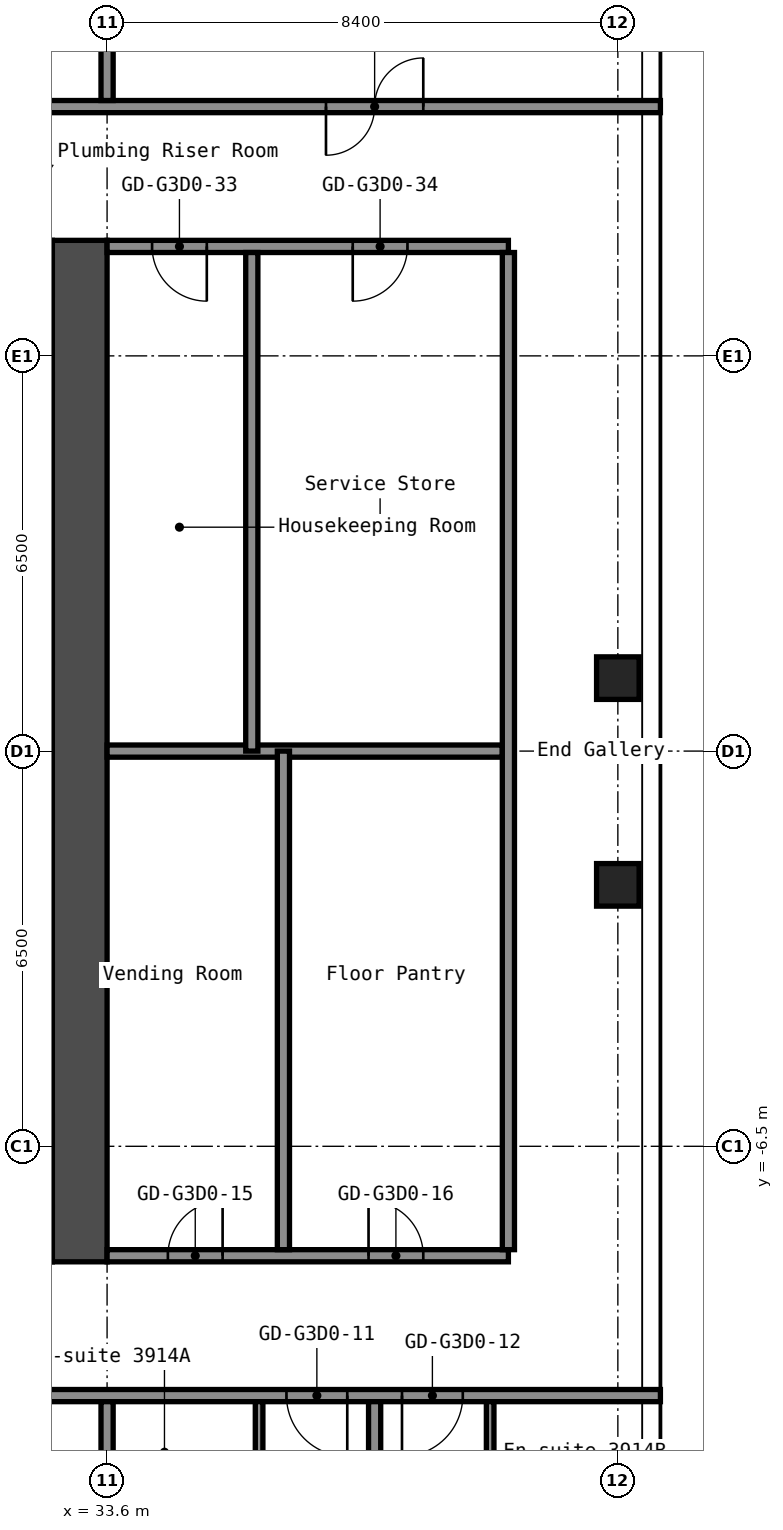
"""IFC4 building model, lengths in metres.
Left out: names, types, materials, properties, quantities, classifications, styles, units other than length and angle.
Written with IfcOpenShell. Run it as: python <this file> out.ifc"""

import sys

from ifc_helpers import new_model, si_unit, direction, frame, frame_2d, origin, origin_2d, place, context, subcontext, project, spatial, rectangle, hollow_rectangle, extrude, element, fill, save


model = new_model("IFC4")
c1 = context("Model", 3, precision=1e-05, world=origin(), true_north=direction((0.0, 1.0)))
c2 = subcontext(c1, "Body", "Model", "MODEL_VIEW")
j1 = project(units=[si_unit("LENGTHUNIT", "METRE"), si_unit("PLANEANGLEUNIT", "RADIAN")], contexts=[c1])
p1 = place(None, origin())
s1 = spatial("IfcSite", under=j1, at=p1, CompositionType="ELEMENT")
p2 = place(p1, origin())
s2 = spatial("IfcBuilding", under=s1, at=p2, CompositionType="ELEMENT")
p3 = place(p2, frame((0.0, 0.0, 140.6)))
s3 = spatial("IfcBuildingStorey", under=s2, at=p3, CompositionType="ELEMENT", Elevation=140.6)
for number, where, z_axis, x_axis in (
    (1, (42.0, -2.2, 0.0), (0.0, 0.0, 1.0), (1.0, 0.0, 0.0)),
    (2, (42.0, 1.2, 0.0), (0.0, 0.0, 1.0), (1.0, 0.0, 0.0)),
):
    element("IfcColumn", number, at=place(p3, frame(where, z_axis=z_axis, x_axis=x_axis)), inside=s3, PredefinedType="COLUMN", context=c2, shape_type="SweptSolid", body=[
        extrude(hollow_rectangle(XDim=0.7, YDim=0.7, WallThickness=0.028, at=origin_2d()), origin(), (0.0, 0.0, 1.0), 2.75),
    ])
p4 = place(p3, frame((33.15, -8.4, 0.0), z_axis=(0.0, 0.0, 1.0), x_axis=(0.0, 1.0, 0.0)))
e3 = element("IfcWall", 3, at=p4, inside=s3, PredefinedType="SHEAR", context=c2, shape_type="SweptSolid", body=[
    extrude(rectangle(XDim=16.8, YDim=0.9, at=frame_2d((8.4, 0.0))), origin(), (0.0, 0.0, 1.0), 2.75),
])
p5 = place(p3, frame((16.8, -10.6, 0.0), z_axis=(0.0, 0.0, 1.0), x_axis=(1.0, 0.0, 0.0)))
e4 = element("IfcWall", 4, at=p5, inside=s3, PredefinedType="PARTITIONING", context=c2, shape_type="SweptSolid", body=[
    extrude(rectangle(XDim=25.9, YDim=0.2, at=frame_2d((12.95, 0.0))), origin(), (0.0, 0.0, 1.0), 2.75),
])
p6 = place(p5, frame((2.85, 0.0, 0.0)))
e5 = element("IfcOpeningElement", 5, at=p6, cuts=e4, PredefinedType="OPENING", context=c2, shape_type="SweptSolid", body=[
    extrude(rectangle(XDim=1.0, YDim=2.1, at=frame_2d((0.5, 1.05))), frame((0.0, 0.11, 0.0), z_axis=(0.0, -1.0, 0.0), x_axis=(1.0, 0.0, 0.0)), (0.0, 0.0, 1.0), 0.22),
])
p7 = place(p5, frame((4.55, 0.0, 0.0)))
e6 = element("IfcOpeningElement", 6, at=p7, cuts=e4, PredefinedType="OPENING", context=c2, shape_type="SweptSolid", body=[
    extrude(rectangle(XDim=1.0, YDim=2.1, at=frame_2d((0.5, 1.05))), frame((0.0, 0.11, 0.0), z_axis=(0.0, -1.0, 0.0), x_axis=(1.0, 0.0, 0.0)), (0.0, 0.0, 1.0), 0.22),
])
p8 = place(p5, frame((10.4, 0.0, 0.0)))
e7 = element("IfcOpeningElement", 7, at=p8, cuts=e4, PredefinedType="OPENING", context=c2, shape_type="SweptSolid", body=[
    extrude(rectangle(XDim=1.0, YDim=2.1, at=frame_2d((0.5, 1.05))), frame((0.0, 0.11, 0.0), z_axis=(0.0, -1.0, 0.0), x_axis=(1.0, 0.0, 0.0)), (0.0, 0.0, 1.0), 0.22),
])
p9 = place(p5, frame((19.75, 0.0, 0.0)))
e8 = element("IfcOpeningElement", 8, at=p9, cuts=e4, PredefinedType="OPENING", context=c2, shape_type="SweptSolid", body=[
    extrude(rectangle(XDim=1.0, YDim=2.1, at=frame_2d((0.5, 1.05))), frame((0.0, 0.11, 0.0), z_axis=(0.0, -1.0, 0.0), x_axis=(1.0, 0.0, 0.0)), (0.0, 0.0, 1.0), 0.22),
])
p10 = place(p5, frame((21.65, 0.0, 0.0)))
e9 = element("IfcOpeningElement", 9, at=p10, cuts=e4, PredefinedType="OPENING", context=c2, shape_type="SweptSolid", body=[
    extrude(rectangle(XDim=1.0, YDim=2.1, at=frame_2d((0.5, 1.05))), frame((0.0, 0.11, 0.0), z_axis=(0.0, -1.0, 0.0), x_axis=(1.0, 0.0, 0.0)), (0.0, 0.0, 1.0), 0.22),
])
p11 = place(p3, frame((33.6, -8.3, 0.0), z_axis=(0.0, 0.0, 1.0), x_axis=(1.0, 0.0, 0.0)))
e10 = element("IfcWall", 10, at=p11, inside=s3, PredefinedType="PARTITIONING", context=c2, shape_type="SweptSolid", body=[
    extrude(rectangle(XDim=6.6, YDim=0.2, at=frame_2d((3.3, 0.0))), origin(), (0.0, 0.0, 1.0), 2.75),
])
p12 = place(p11, frame((1.0, 0.0, 0.0)))
e11 = element("IfcOpeningElement", 11, at=p12, cuts=e10, PredefinedType="OPENING", context=c2, shape_type="SweptSolid", body=[
    extrude(rectangle(XDim=0.9, YDim=2.1, at=frame_2d((0.45, 1.05))), frame((0.0, 0.11, 0.0), z_axis=(0.0, -1.0, 0.0), x_axis=(1.0, 0.0, 0.0)), (0.0, 0.0, 1.0), 0.22),
])
p13 = place(p11, frame((4.3, 0.0, 0.0)))
e12 = element("IfcOpeningElement", 12, at=p13, cuts=e10, PredefinedType="OPENING", context=c2, shape_type="SweptSolid", body=[
    extrude(rectangle(XDim=0.9, YDim=2.1, at=frame_2d((0.45, 1.05))), frame((0.0, 0.11, 0.0), z_axis=(0.0, -1.0, 0.0), x_axis=(1.0, 0.0, 0.0)), (0.0, 0.0, 1.0), 0.22),
])
p14 = place(p3, frame((33.6, 0.0, 0.0), z_axis=(0.0, 0.0, 1.0), x_axis=(1.0, 0.0, 0.0)))
e13 = element("IfcWall", 13, at=p14, inside=s3, PredefinedType="PARTITIONING", context=c2, shape_type="SweptSolid", body=[
    extrude(rectangle(XDim=6.5, YDim=0.2, at=frame_2d((3.25, 0.0))), origin(), (0.0, 0.0, 1.0), 2.75),
])
p15 = place(p3, frame((33.6, 8.3, 0.0), z_axis=(0.0, 0.0, 1.0), x_axis=(1.0, 0.0, 0.0)))
e14 = element("IfcWall", 14, at=p15, inside=s3, PredefinedType="PARTITIONING", context=c2, shape_type="SweptSolid", body=[
    extrude(rectangle(XDim=6.6, YDim=0.2, at=frame_2d((3.3, 0.0))), origin(), (0.0, 0.0, 1.0), 2.75),
])
p16 = place(p15, frame((0.74, 0.0, 0.0)))
e15 = element("IfcOpeningElement", 15, at=p16, cuts=e14, PredefinedType="OPENING", context=c2, shape_type="SweptSolid", body=[
    extrude(rectangle(XDim=0.9, YDim=2.1, at=frame_2d((0.45, 1.05))), frame((0.0, 0.11, 0.0), z_axis=(0.0, -1.0, 0.0), x_axis=(1.0, 0.0, 0.0)), (0.0, 0.0, 1.0), 0.22),
])
p17 = place(p15, frame((4.04, 0.0, 0.0)))
e16 = element("IfcOpeningElement", 16, at=p17, cuts=e14, PredefinedType="OPENING", context=c2, shape_type="SweptSolid", body=[
    extrude(rectangle(XDim=0.9, YDim=2.1, at=frame_2d((0.45, 1.05))), frame((0.0, 0.11, 0.0), z_axis=(0.0, -1.0, 0.0), x_axis=(1.0, 0.0, 0.0)), (0.0, 0.0, 1.0), 0.22),
])
p18 = place(p3, frame((16.8, 10.6, 0.0), z_axis=(0.0, 0.0, 1.0), x_axis=(1.0, 0.0, 0.0)))
e17 = element("IfcWall", 17, at=p18, inside=s3, PredefinedType="PARTITIONING", context=c2, shape_type="SweptSolid", body=[
    extrude(rectangle(XDim=25.9, YDim=0.2, at=frame_2d((12.95, 0.0))), origin(), (0.0, 0.0, 1.0), 2.75),
])
p19 = place(p18, frame((3.4, 0.0, 0.0)))
e18 = element("IfcOpeningElement", 18, at=p19, cuts=e17, PredefinedType="OPENING", context=c2, shape_type="SweptSolid", body=[
    extrude(rectangle(XDim=1.6, YDim=2.1, at=frame_2d((0.8, 1.05))), frame((0.0, 0.11, 0.0), z_axis=(0.0, -1.0, 0.0), x_axis=(1.0, 0.0, 0.0)), (0.0, 0.0, 1.0), 0.22),
])
p20 = place(p18, frame((11.8, 0.0, 0.0)))
e19 = element("IfcOpeningElement", 19, at=p20, cuts=e17, PredefinedType="OPENING", context=c2, shape_type="SweptSolid", body=[
    extrude(rectangle(XDim=1.6, YDim=2.1, at=frame_2d((0.8, 1.05))), frame((0.0, 0.11, 0.0), z_axis=(0.0, -1.0, 0.0), x_axis=(1.0, 0.0, 0.0)), (0.0, 0.0, 1.0), 0.22),
])
p21 = place(p18, frame((20.4, 0.0, 0.0)))
e20 = element("IfcOpeningElement", 20, at=p21, cuts=e17, PredefinedType="OPENING", context=c2, shape_type="SweptSolid", body=[
    extrude(rectangle(XDim=1.6, YDim=2.1, at=frame_2d((0.8, 1.05))), frame((0.0, 0.11, 0.0), z_axis=(0.0, -1.0, 0.0), x_axis=(1.0, 0.0, 0.0)), (0.0, 0.0, 1.0), 0.22),
])
p22 = place(p3, frame((33.6, -19.3, 0.0), z_axis=(0.0, 0.0, 1.0), x_axis=(0.0, 1.0, 0.0)))
e21 = element("IfcWall", 21, at=p22, inside=s3, PredefinedType="PARTITIONING", context=c2, shape_type="SweptSolid", body=[
    extrude(rectangle(XDim=8.6, YDim=0.2, at=frame_2d((4.3, 0.0))), origin(), (0.0, 0.0, 1.0), 2.75),
])
p23 = place(p3, frame((33.6, 10.7, 0.0), z_axis=(0.0, 0.0, 1.0), x_axis=(0.0, 1.0, 0.0)))
e22 = element("IfcWall", 22, at=p23, inside=s3, PredefinedType="PARTITIONING", context=c2, shape_type="SweptSolid", body=[
    extrude(rectangle(XDim=7.6, YDim=0.2, at=frame_2d((3.8, 0.0))), origin(), (0.0, 0.0, 1.0), 2.75),
])
p24 = place(p3, frame((35.98, 0.0, 0.0), z_axis=(0.0, 0.0, 1.0), x_axis=(0.0, 1.0, 0.0)))
e23 = element("IfcWall", 23, at=p24, inside=s3, PredefinedType="PARTITIONING", context=c2, shape_type="SweptSolid", body=[
    extrude(rectangle(XDim=8.2, YDim=0.2, at=frame_2d((4.1, 0.0))), origin(), (0.0, 0.0, 1.0), 2.75),
])
p25 = place(p3, frame((36.1, -13.6, 0.0), z_axis=(0.0, 0.0, 1.0), x_axis=(0.0, 1.0, 0.0)))
e24 = element("IfcWall", 24, at=p25, inside=s3, PredefinedType="PARTITIONING", context=c2, shape_type="SweptSolid", body=[
    extrude(rectangle(XDim=2.9, YDim=0.125, at=frame_2d((1.45, 0.0))), origin(), (0.0, 0.0, 1.0), 2.75),
])
p26 = place(p25, frame((0.6, 0.0, 0.0)))
e25 = element("IfcOpeningElement", 25, at=p26, cuts=e24, PredefinedType="OPENING", context=c2, shape_type="SweptSolid", body=[
    extrude(rectangle(XDim=0.8, YDim=2.1, at=frame_2d((0.4, 1.05))), frame((0.0, 0.073, 0.0), z_axis=(0.0, -1.0, 0.0), x_axis=(1.0, 0.0, 0.0)), (0.0, 0.0, 1.0), 0.145),
])
p27 = place(p3, frame((36.5, -8.2, 0.0), z_axis=(0.0, 0.0, 1.0), x_axis=(0.0, 1.0, 0.0)))
e26 = element("IfcWall", 26, at=p27, inside=s3, PredefinedType="PARTITIONING", context=c2, shape_type="SweptSolid", body=[
    extrude(rectangle(XDim=8.2, YDim=0.2, at=frame_2d((4.1, 0.0))), origin(), (0.0, 0.0, 1.0), 2.75),
])
p28 = place(p3, frame((38.0, -19.3, 0.0), z_axis=(0.0, 0.0, 1.0), x_axis=(0.0, 1.0, 0.0)))
e27 = element("IfcWall", 27, at=p28, inside=s3, PredefinedType="PARTITIONING", context=c2, shape_type="SweptSolid", body=[
    extrude(rectangle(XDim=8.6, YDim=0.2, at=frame_2d((4.3, 0.0))), origin(), (0.0, 0.0, 1.0), 2.75),
])
p29 = place(p3, frame((39.9, -13.6, 0.0), z_axis=(0.0, 0.0, 1.0), x_axis=(0.0, 1.0, 0.0)))
e28 = element("IfcWall", 28, at=p29, inside=s3, PredefinedType="PARTITIONING", context=c2, shape_type="SweptSolid", body=[
    extrude(rectangle(XDim=2.9, YDim=0.125, at=frame_2d((1.45, 0.0))), origin(), (0.0, 0.0, 1.0), 2.75),
])
p30 = place(p29, frame((0.6, 0.0, 0.0)))
e29 = element("IfcOpeningElement", 29, at=p30, cuts=e28, PredefinedType="OPENING", context=c2, shape_type="SweptSolid", body=[
    extrude(rectangle(XDim=0.8, YDim=2.1, at=frame_2d((0.4, 1.05))), frame((0.0, 0.073, 0.0), z_axis=(0.0, -1.0, 0.0), x_axis=(1.0, 0.0, 0.0)), (0.0, 0.0, 1.0), 0.145),
])
p31 = place(p3, frame((40.2, -8.2, 0.0), z_axis=(0.0, 0.0, 1.0), x_axis=(0.0, 1.0, 0.0)))
e30 = element("IfcWall", 30, at=p31, inside=s3, PredefinedType="PARTITIONING", context=c2, shape_type="SweptSolid", body=[
    extrude(rectangle(XDim=16.4, YDim=0.2, at=frame_2d((8.2, 0.0))), origin(), (0.0, 0.0, 1.0), 2.75),
])
p32 = place(p9, origin())
e31 = element("IfcDoor", 31, at=p32, inside=s3, OperationType="SINGLE_SWING_RIGHT", PredefinedType="DOOR", context=c2, shape_type="SweptSolid", body=[
    extrude(rectangle(XDim=1.0, YDim=2.1, at=frame_2d((0.5, 1.05))), frame((0.0, 0.025, 0.0), z_axis=(0.0, -1.0, 0.0), x_axis=(1.0, 0.0, 0.0)), (0.0, 0.0, 1.0), 0.05),
])
fill(e8, e31)
p33 = place(p10, origin())
e32 = element("IfcDoor", 32, at=p33, inside=s3, OperationType="SINGLE_SWING_LEFT", PredefinedType="DOOR", context=c2, shape_type="SweptSolid", body=[
    extrude(rectangle(XDim=1.0, YDim=2.1, at=frame_2d((0.5, 1.05))), frame((0.0, 0.025, 0.0), z_axis=(0.0, -1.0, 0.0), x_axis=(1.0, 0.0, 0.0)), (0.0, 0.0, 1.0), 0.05),
])
fill(e9, e32)
p34 = place(p12, origin())
e33 = element("IfcDoor", 33, at=p34, inside=s3, OperationType="SINGLE_SWING_LEFT", PredefinedType="DOOR", context=c2, shape_type="SweptSolid", body=[
    extrude(rectangle(XDim=0.9, YDim=2.1, at=frame_2d((0.45, 1.05))), frame((0.0, 0.025, 0.0), z_axis=(0.0, -1.0, 0.0), x_axis=(1.0, 0.0, 0.0)), (0.0, 0.0, 1.0), 0.05),
])
fill(e11, e33)
p35 = place(p13, origin())
e34 = element("IfcDoor", 34, at=p35, inside=s3, OperationType="SINGLE_SWING_RIGHT", PredefinedType="DOOR", context=c2, shape_type="SweptSolid", body=[
    extrude(rectangle(XDim=0.9, YDim=2.1, at=frame_2d((0.45, 1.05))), frame((0.0, 0.025, 0.0), z_axis=(0.0, -1.0, 0.0), x_axis=(1.0, 0.0, 0.0)), (0.0, 0.0, 1.0), 0.05),
])
fill(e12, e34)
p36 = place(p16, origin())
e35 = element("IfcDoor", 35, at=p36, inside=s3, OperationType="SINGLE_SWING_RIGHT", PredefinedType="DOOR", context=c2, shape_type="SweptSolid", body=[
    extrude(rectangle(XDim=0.9, YDim=2.1, at=frame_2d((0.45, 1.05))), frame((0.0, 0.025, 0.0), z_axis=(0.0, -1.0, 0.0), x_axis=(1.0, 0.0, 0.0)), (0.0, 0.0, 1.0), 0.05),
])
fill(e15, e35)
p37 = place(p17, origin())
e36 = element("IfcDoor", 36, at=p37, inside=s3, OperationType="SINGLE_SWING_LEFT", PredefinedType="DOOR", context=c2, shape_type="SweptSolid", body=[
    extrude(rectangle(XDim=0.9, YDim=2.1, at=frame_2d((0.45, 1.05))), frame((0.0, 0.025, 0.0), z_axis=(0.0, -1.0, 0.0), x_axis=(1.0, 0.0, 0.0)), (0.0, 0.0, 1.0), 0.05),
])
fill(e16, e36)
p38 = place(p21, origin())
e37 = element("IfcDoor", 37, at=p38, inside=s3, OperationType="DOUBLE_DOOR_SINGLE_SWING", PredefinedType="DOOR", context=c2, shape_type="SweptSolid", body=[
    extrude(rectangle(XDim=1.6, YDim=2.1, at=frame_2d((0.8, 1.05))), frame((0.0, 0.025, 0.0), z_axis=(0.0, -1.0, 0.0), x_axis=(1.0, 0.0, 0.0)), (0.0, 0.0, 1.0), 0.05),
])
fill(e20, e37)
save(model, sys.argv[1])
